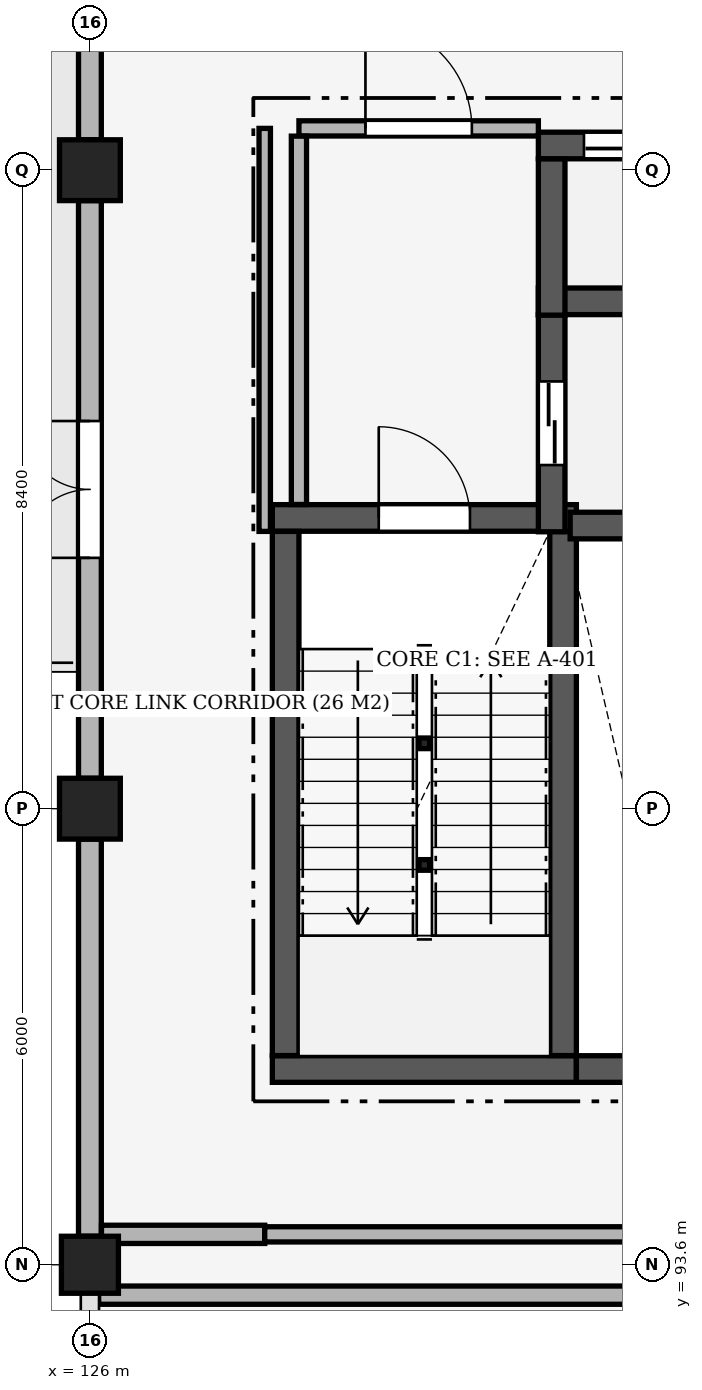
"""IFC4 building model, lengths in metres.
Left out: names, types, materials, properties, quantities, classifications, styles, units other than length and angle.
Written with IfcOpenShell. Run it as: python <this file> out.ifc"""

import sys

from ifc_helpers import new_model, si_unit, direction, frame, frame_2d, origin, origin_2d, place, context, subcontext, project, spatial, rectangle, hollow_circle, extrude, element, fill, save


model = new_model("IFC4")
c1 = context("Model", 3, precision=1e-05, world=origin(), true_north=direction((0.0, 1.0)))
c2 = subcontext(c1, "Body", "Model", "MODEL_VIEW")
j1 = project(units=[si_unit("LENGTHUNIT", "METRE"), si_unit("PLANEANGLEUNIT", "RADIAN")], contexts=[c1])
p1 = place(None, origin())
s1 = spatial("IfcSite", under=j1, at=p1, CompositionType="ELEMENT")
p2 = place(p1, origin())
s2 = spatial("IfcBuilding", under=s1, at=p2, CompositionType="ELEMENT")
p3 = place(p2, frame((0.0, 0.0, 10.2)))
s3 = spatial("IfcBuildingStorey", under=s2, at=p3, CompositionType="ELEMENT", Elevation=10.2)
p4 = place(p3, frame((126.0, 93.6, 0.0), z_axis=(0.0, 0.0, 1.0), x_axis=(1.0, 0.0, 0.0)))
e1 = element("IfcColumn", 1, at=p4, inside=s3, PredefinedType="COLUMN", context=c2, shape_type="SweptSolid", body=[
    extrude(rectangle(XDim=0.75, YDim=0.75, at=origin_2d()), origin(), (0.0, 0.0, 1.0), 5.1),
])
for number, where, z_axis, x_axis in (
    (2, (126.0, 99.6, 0.0), (0.0, 0.0, 1.0), (1.0, 0.0, 0.0)),
    (3, (126.0, 108.0, 0.0), (0.0, 0.0, 1.0), (1.0, 0.0, 0.0)),
):
    element("IfcColumn", number, at=place(p3, frame(where, z_axis=z_axis, x_axis=x_axis)), inside=s3, PredefinedType="COLUMN", context=c2, shape_type="SweptSolid", body=[
        extrude(rectangle(XDim=0.8, YDim=0.8, at=origin_2d()), origin(), (0.0, 0.0, 1.0), 5.1),
    ])
for number, where, z_axis, x_axis in (
    (4, (130.4, 98.86, -2.98), (0.0, 0.0, 1.0), (1.0, 0.0, 0.0)),
    (5, (130.4, 100.46, -2.98), (0.0, 0.0, 1.0), (1.0, 0.0, 0.0)),
):
    element("IfcColumn", number, at=place(p3, frame(where, z_axis=z_axis, x_axis=x_axis)), inside=s3, PredefinedType="COLUMN", context=c2, shape_type="SweptSolid", body=[
        extrude(hollow_circle(Radius=0.07, WallThickness=0.008, at=origin_2d()), origin(), (0.0, 0.0, 1.0), 5.1),
    ])
p5 = place(p3, frame((126.0, 93.975, 0.0), z_axis=(0.0, 0.0, 1.0), x_axis=(0.0, 1.0, 0.0)))
e6 = element("IfcWall", 6, at=p5, inside=s3, PredefinedType="SOLIDWALL", context=c2, shape_type="SweptSolid", body=[
    extrude(rectangle(XDim=5.225, YDim=0.3, at=frame_2d((2.612, 0.0))), origin(), (0.0, 0.0, 1.0), 4.27),
])
p6 = place(p3, frame((126.0, 100.0, 0.0), z_axis=(0.0, 0.0, 1.0), x_axis=(0.0, 1.0, 0.0)))
e7 = element("IfcWall", 7, at=p6, inside=s3, PredefinedType="SOLIDWALL", context=c2, shape_type="SweptSolid", body=[
    extrude(rectangle(XDim=7.6, YDim=0.3, at=frame_2d((3.8, 0.0))), origin(), (0.0, 0.0, 1.0), 4.12),
])
p7 = place(p6, frame((2.9, 0.0, 0.0)))
e8 = element("IfcOpeningElement", 8, at=p7, cuts=e7, PredefinedType="OPENING", context=c2, shape_type="SweptSolid", body=[
    extrude(rectangle(XDim=1.8, YDim=2.2, at=frame_2d((0.9, 1.1))), frame((0.0, 0.165, 0.0), z_axis=(0.0, -1.0, 0.0), x_axis=(1.0, 0.0, 0.0)), (0.0, 0.0, 1.0), 0.33),
])
p8 = place(p3, frame((126.0, 108.4, 0.0), z_axis=(0.0, 0.0, 1.0), x_axis=(0.0, 1.0, 0.0)))
e9 = element("IfcWall", 9, at=p8, inside=s3, PredefinedType="SOLIDWALL", context=c2, shape_type="SweptSolid", body=[
    extrude(rectangle(XDim=4.6, YDim=0.3, at=frame_2d((2.3, 0.0))), origin(), (0.0, 0.0, 1.0), 4.27),
])
p9 = place(p8, frame((1.5, 0.0, 1.05)))
e10 = element("IfcOpeningElement", 10, at=p9, cuts=e9, PredefinedType="OPENING", context=c2, shape_type="SweptSolid", body=[
    extrude(rectangle(XDim=1.6, YDim=1.8, at=frame_2d((0.8, 0.9))), frame((0.0, 0.165, 0.0), z_axis=(0.0, -1.0, 0.0), x_axis=(1.0, 0.0, 0.0)), (0.0, 0.0, 1.0), 0.33),
])
p10 = place(p3, frame((128.4, 103.425, 0.0), z_axis=(0.0, 0.0, 1.0), x_axis=(1.0, 0.0, 0.0)))
e11 = element("IfcWall", 11, at=p10, inside=s3, PredefinedType="SHEAR", context=c2, shape_type="SweptSolid", body=[
    extrude(rectangle(XDim=4.0, YDim=0.35, at=frame_2d((2.0, 0.0))), origin(), (0.0, 0.0, 1.0), 4.82),
])
p11 = place(p10, frame((1.4, 0.0, 0.0)))
e12 = element("IfcOpeningElement", 12, at=p11, cuts=e11, PredefinedType="OPENING", context=c2, shape_type="SweptSolid", body=[
    extrude(rectangle(XDim=1.2, YDim=2.2, at=frame_2d((0.6, 1.1))), frame((0.0, 0.19, 0.0), z_axis=(0.0, -1.0, 0.0), x_axis=(1.0, 0.0, 0.0)), (0.0, 0.0, 1.0), 0.38),
])
p12 = place(p3, frame((128.4, 96.175, 0.0), z_axis=(0.0, 0.0, 1.0), x_axis=(1.0, 0.0, 0.0)))
e13 = element("IfcWall", 13, at=p12, inside=s3, PredefinedType="SHEAR", context=c2, shape_type="SweptSolid", body=[
    extrude(rectangle(XDim=4.0, YDim=0.35, at=frame_2d((2.0, 0.0))), origin(), (0.0, 0.0, 1.0), 4.82),
])
for number, where, z_axis, x_axis in (
    (14, (128.575, 96.352, 0.0), (0.0, 0.0, 1.0), (0.0, 1.0, 0.0)),
    (15, (132.225, 96.352, 0.0), (0.0, 0.0, 1.0), (0.0, 1.0, 0.0)),
):
    element("IfcWall", number, at=place(p3, frame(where, z_axis=z_axis, x_axis=x_axis)), inside=s3, PredefinedType="SHEAR", context=c2, shape_type="SweptSolid", body=[
        extrude(rectangle(XDim=6.896, YDim=0.35, at=frame_2d((3.448, 0.0))), origin(), (0.0, 0.0, 1.0), 4.82),
    ])
p13 = place(p3, frame((132.318, 103.325, 0.0), z_axis=(0.0, 0.0, 1.0), x_axis=(1.0, 0.0, 0.0)))
e16 = element("IfcWall", 16, at=p13, inside=s3, PredefinedType="SHEAR", context=c2, shape_type="SweptSolid", body=[
    extrude(rectangle(XDim=1.882, YDim=0.35, at=frame_2d((0.941, 0.0))), origin(), (0.0, 0.0, 1.0), 4.82),
])
p14 = place(p3, frame((131.9, 106.275, 0.0), z_axis=(0.0, 0.0, 1.0), x_axis=(1.0, 0.0, 0.0)))
e17 = element("IfcWall", 17, at=p14, inside=s3, PredefinedType="SHEAR", context=c2, shape_type="SweptSolid", body=[
    extrude(rectangle(XDim=2.3, YDim=0.35, at=frame_2d((1.15, 0.0))), origin(), (0.0, 0.0, 1.0), 4.82),
])
p15 = place(p3, frame((132.075, 103.243, 0.0), z_axis=(0.0, 0.0, 1.0), x_axis=(0.0, 1.0, 0.0)))
e18 = element("IfcWall", 18, at=p15, inside=s3, PredefinedType="SHEAR", context=c2, shape_type="SweptSolid", body=[
    extrude(rectangle(XDim=2.855, YDim=0.35, at=frame_2d((1.427, 0.0))), origin(), (0.0, 0.0, 1.0), 4.82),
])
p16 = place(p15, frame((0.878, 0.0, 0.0)))
e19 = element("IfcOpeningElement", 19, at=p16, cuts=e18, PredefinedType="OPENING", context=c2, shape_type="SweptSolid", body=[
    extrude(rectangle(XDim=1.1, YDim=2.15, at=frame_2d((0.55, 1.075))), frame((0.0, 0.19, 0.0), z_axis=(0.0, -1.0, 0.0), x_axis=(1.0, 0.0, 0.0)), (0.0, 0.0, 1.0), 0.38),
])
p17 = place(p3, frame((131.9, 108.325, 0.0), z_axis=(0.0, 0.0, 1.0), x_axis=(1.0, 0.0, 0.0)))
e20 = element("IfcWall", 20, at=p17, inside=s3, PredefinedType="SHEAR", context=c2, shape_type="SweptSolid", body=[
    extrude(rectangle(XDim=2.3, YDim=0.35, at=frame_2d((1.15, 0.0))), origin(), (0.0, 0.0, 1.0), 4.82),
])
p18 = place(p17, frame((0.6, 0.0, 0.0)))
e21 = element("IfcOpeningElement", 21, at=p18, cuts=e20, PredefinedType="OPENING", context=c2, shape_type="SweptSolid", body=[
    extrude(rectangle(XDim=1.1, YDim=2.15, at=frame_2d((0.55, 1.075))), frame((0.0, 0.19, 0.0), z_axis=(0.0, -1.0, 0.0), x_axis=(1.0, 0.0, 0.0)), (0.0, 0.0, 1.0), 0.38),
])
p19 = place(p3, frame((132.075, 106.093, 0.0), z_axis=(0.0, 0.0, 1.0), x_axis=(0.0, 1.0, 0.0)))
e22 = element("IfcWall", 22, at=p19, inside=s3, PredefinedType="SHEAR", context=c2, shape_type="SweptSolid", body=[
    extrude(rectangle(XDim=2.055, YDim=0.35, at=frame_2d((1.027, 0.0))), origin(), (0.0, 0.0, 1.0), 4.82),
])
p20 = place(p3, frame((132.4, 96.175, 0.0), z_axis=(0.0, 0.0, 1.0), x_axis=(1.0, 0.0, 0.0)))
e23 = element("IfcWall", 23, at=p20, inside=s3, PredefinedType="SHEAR", context=c2, shape_type="SweptSolid", body=[
    extrude(rectangle(XDim=1.8, YDim=0.35, at=frame_2d((0.9, 0.0))), origin(), (0.0, 0.0, 1.0), 4.82),
])
p21 = place(p3, frame((126.115, 93.2, 0.0), z_axis=(0.0, 0.0, 1.0), x_axis=(1.0, 0.0, 0.0)))
e24 = element("IfcWall", 24, at=p21, inside=s3, PredefinedType="PARTITIONING", context=c2, shape_type="SweptSolid", body=[
    extrude(rectangle(XDim=12.685, YDim=0.24, at=frame_2d((6.343, 0.0))), origin(), (0.0, 0.0, 1.0), 4.12),
])
p22 = place(p3, frame((126.152, 94.0, 0.0), z_axis=(0.0, 0.0, 1.0), x_axis=(1.0, 0.0, 0.0)))
e25 = element("IfcWall", 25, at=p22, inside=s3, PredefinedType="PARTITIONING", context=c2, shape_type="SweptSolid", body=[
    extrude(rectangle(XDim=2.148, YDim=0.24, at=frame_2d((1.074, 0.0))), origin(), (0.0, 0.0, 1.0), 4.27),
])
p23 = place(p3, frame((128.3, 94.0, 0.0), z_axis=(0.0, 0.0, 1.0), x_axis=(1.0, 0.0, 0.0)))
e26 = element("IfcWall", 26, at=p23, inside=s3, PredefinedType="PARTITIONING", context=c2, shape_type="SweptSolid", body=[
    extrude(rectangle(XDim=10.5, YDim=0.2, at=frame_2d((5.25, 0.0))), origin(), (0.0, 0.0, 1.0), 4.27),
])
p24 = place(p3, frame((128.75, 108.55, 0.0), z_axis=(0.0, 0.0, 1.0), x_axis=(1.0, 0.0, 0.0)))
e27 = element("IfcWall", 27, at=p24, inside=s3, PredefinedType="PARTITIONING", context=c2, shape_type="SweptSolid", body=[
    extrude(rectangle(XDim=3.15, YDim=0.2, at=frame_2d((1.575, 0.0))), origin(), (0.0, 0.0, 1.0), 4.82),
])
p25 = place(p24, frame((0.875, 0.0, 0.0)))
e28 = element("IfcOpeningElement", 28, at=p25, cuts=e27, PredefinedType="OPENING", context=c2, shape_type="SweptSolid", body=[
    extrude(rectangle(XDim=1.4, YDim=2.2, at=frame_2d((0.7, 1.1))), frame((0.0, 0.115, 0.0), z_axis=(0.0, -1.0, 0.0), x_axis=(1.0, 0.0, 0.0)), (0.0, 0.0, 1.0), 0.23),
])
p26 = place(p3, frame((128.3, 103.248, 0.0), z_axis=(0.0, 0.0, 1.0), x_axis=(0.0, 1.0, 0.0)))
e29 = element("IfcWall", 29, at=p26, inside=s3, PredefinedType="PARTITIONING", context=c2, shape_type="SweptSolid", body=[
    extrude(rectangle(XDim=5.302, YDim=0.15, at=frame_2d((2.651, 0.0))), origin(), (0.0, 0.0, 1.0), 4.82),
])
p27 = place(p3, frame((128.75, 103.602, 0.0), z_axis=(0.0, 0.0, 1.0), x_axis=(0.0, 1.0, 0.0)))
e30 = element("IfcWall", 30, at=p27, inside=s3, PredefinedType="PARTITIONING", context=c2, shape_type="SweptSolid", body=[
    extrude(rectangle(XDim=4.846, YDim=0.2, at=frame_2d((2.423, 0.0))), origin(), (0.0, 0.0, 1.0), 4.82),
])
p28 = place(p7, origin())
e31 = element("IfcDoor", 31, at=p28, inside=s3, OperationType="DOUBLE_DOOR_SINGLE_SWING", PredefinedType="DOOR", context=c2, shape_type="SweptSolid", body=[
    extrude(rectangle(XDim=1.8, YDim=2.2, at=frame_2d((0.9, 1.1))), frame((0.0, 0.025, 0.0), z_axis=(0.0, -1.0, 0.0), x_axis=(1.0, 0.0, 0.0)), (0.0, 0.0, 1.0), 0.05),
])
fill(e8, e31)
p29 = place(p11, origin())
e32 = element("IfcDoor", 32, at=p29, inside=s3, OperationType="SINGLE_SWING_LEFT", PredefinedType="DOOR", context=c2, shape_type="SweptSolid", body=[
    extrude(rectangle(XDim=1.2, YDim=2.2, at=frame_2d((0.6, 1.1))), frame((0.0, 0.025, 0.0), z_axis=(0.0, -1.0, 0.0), x_axis=(1.0, 0.0, 0.0)), (0.0, 0.0, 1.0), 0.05),
])
fill(e12, e32)
p30 = place(p16, origin())
e33 = element("IfcDoor", 33, at=p30, inside=s3, OperationType="DOUBLE_DOOR_SLIDING", PredefinedType="DOOR", context=c2, shape_type="SweptSolid", body=[
    extrude(rectangle(XDim=1.1, YDim=2.15, at=frame_2d((0.55, 1.075))), frame((0.0, 0.025, 0.0), z_axis=(0.0, -1.0, 0.0), x_axis=(1.0, 0.0, 0.0)), (0.0, 0.0, 1.0), 0.05),
])
fill(e19, e33)
p31 = place(p18, origin())
e34 = element("IfcDoor", 34, at=p31, inside=s3, OperationType="DOUBLE_DOOR_SLIDING", PredefinedType="DOOR", context=c2, shape_type="SweptSolid", body=[
    extrude(rectangle(XDim=1.1, YDim=2.15, at=frame_2d((0.55, 1.075))), frame((0.0, 0.025, 0.0), z_axis=(0.0, -1.0, 0.0), x_axis=(1.0, 0.0, 0.0)), (0.0, 0.0, 1.0), 0.05),
])
fill(e21, e34)
p32 = place(p25, origin())
e35 = element("IfcDoor", 35, at=p32, inside=s3, OperationType="SINGLE_SWING_LEFT", PredefinedType="DOOR", context=c2, shape_type="SweptSolid", body=[
    extrude(rectangle(XDim=1.4, YDim=2.2, at=frame_2d((0.7, 1.1))), frame((0.0, 0.025, 0.0), z_axis=(0.0, -1.0, 0.0), x_axis=(1.0, 0.0, 0.0)), (0.0, 0.0, 1.0), 0.05),
])
fill(e28, e35)
save(model, sys.argv[1])
